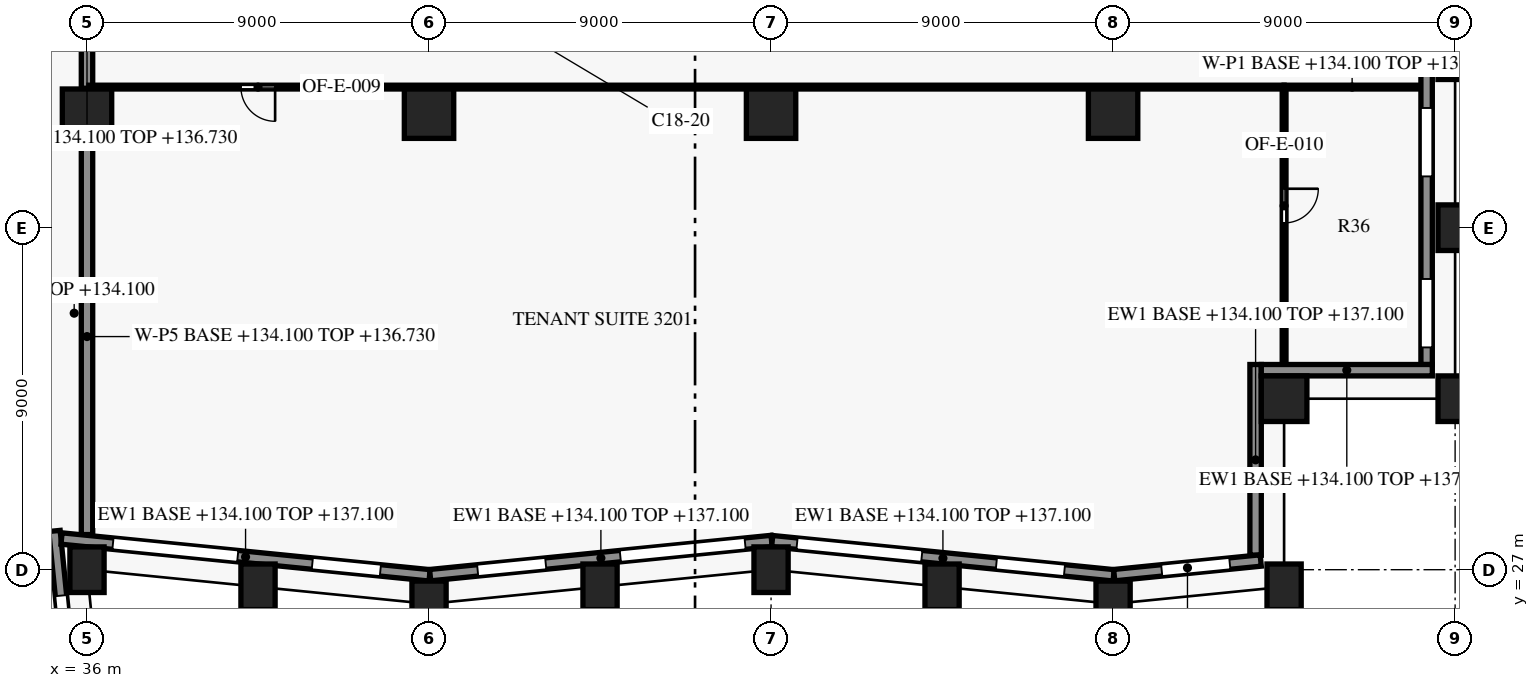
"""IFC4 building model, lengths in metres.
Left out: names, types, materials, properties, quantities, classifications, styles, units other than length and angle.
Written with IfcOpenShell. Run it as: python <this file> out.ifc"""

import sys

from ifc_helpers import new_model, si_unit, direction, frame, frame_2d, origin, origin_2d, place, context, subcontext, project, spatial, rectangle, extrude, element, fill, save


model = new_model("IFC4")
c1 = context("Model", 3, precision=1e-05, world=origin(), true_north=direction((0.0, 1.0)))
c2 = subcontext(c1, "Body", "Model", "MODEL_VIEW")
j1 = project(units=[si_unit("LENGTHUNIT", "METRE"), si_unit("PLANEANGLEUNIT", "RADIAN")], contexts=[c1])
p1 = place(None, origin())
s1 = spatial("IfcSite", under=j1, at=p1, CompositionType="ELEMENT")
p2 = place(p1, origin())
s2 = spatial("IfcBuilding", under=s1, at=p2, CompositionType="ELEMENT")
p3 = place(p2, frame((0.0, 0.0, 134.1)))
s3 = spatial("IfcBuildingStorey", under=s2, at=p3, CompositionType="ELEMENT", Elevation=134.1)
for number, where, z_axis, x_axis in (
    (1, (36.0, 27.0, 0.0), (0.0, 0.0, 1.0), (-0.1, 0.995, 0.0)),
    (2, (40.5, 26.55, 0.0), (0.0, 0.0, 1.0), (0.995, -0.1, 0.0)),
    (3, (45.0, 26.1, 0.0), (0.0, 0.0, 1.0), (1.0, 0.0, 0.0)),
    (4, (49.5, 26.55, 0.0), (0.0, 0.0, 1.0), (0.995, 0.1, 0.0)),
    (5, (54.0, 27.0, 0.0), (0.0, 0.0, 1.0), (1.0, 0.0, 0.0)),
    (6, (58.5, 26.55, 0.0), (0.0, 0.0, 1.0), (0.995, -0.1, 0.0)),
    (7, (63.0, 26.1, 0.0), (0.0, 0.0, 1.0), (1.0, 0.0, 0.0)),
    (8, (67.5, 26.55, 0.0), (0.0, 0.0, 1.0), (0.995, 0.1, 0.0)),
    (9, (72.0, 31.5, 0.0), (0.0, 0.0, 1.0), (0.0, 1.0, 0.0)),
    (10, (72.0, 36.0, 0.0), (0.0, 0.0, 1.0), (0.0, 1.0, 0.0)),
    (11, (72.0, 40.5, 0.0), (0.0, 0.0, 1.0), (0.0, 1.0, 0.0)),
):
    element("IfcColumn", number, at=place(p3, frame(where, z_axis=z_axis, x_axis=x_axis)), inside=s3, PredefinedType="COLUMN", context=c2, shape_type="SweptSolid", body=[
        extrude(rectangle(XDim=0.9, YDim=1.2, at=origin_2d()), origin(), (0.0, 0.0, 1.0), 3.8),
    ])
p4 = place(p3, frame((67.5, 31.5, 0.0), z_axis=(0.0, 0.0, 1.0), x_axis=(1.0, 0.0, 0.0)))
e12 = element("IfcColumn", 12, at=p4, inside=s3, PredefinedType="COLUMN", context=c2, shape_type="SweptSolid", body=[
    extrude(rectangle(XDim=1.2, YDim=1.2, at=origin_2d()), origin(), (0.0, 0.0, 1.0), 3.8),
])
for number, where, z_axis, x_axis in (
    (13, (36.0, 39.0, 0.0), (0.0, 0.0, 1.0), (1.0, 0.0, 0.0)),
    (14, (45.0, 39.0, 0.0), (0.0, 0.0, 1.0), (1.0, 0.0, 0.0)),
    (15, (54.0, 39.0, 0.0), (0.0, 0.0, 1.0), (1.0, 0.0, 0.0)),
    (16, (63.0, 39.0, 0.0), (0.0, 0.0, 1.0), (1.0, 0.0, 0.0)),
):
    element("IfcColumn", number, at=place(p3, frame(where, z_axis=z_axis, x_axis=x_axis)), inside=s3, PredefinedType="COLUMN", context=c2, shape_type="SweptSolid", body=[
        extrude(rectangle(XDim=1.3, YDim=1.3, at=origin_2d()), origin(), (0.0, 0.0, 1.0), 3.8),
    ])
p5 = place(p3, frame((35.144, 28.02, 0.0), z_axis=(0.0, 0.0, 1.0), x_axis=(0.099503719021, -0.99503719021, 0.0)))
e17 = element("IfcWall", 17, at=p5, inside=s3, PredefinedType="SOLIDWALL", context=c2, shape_type="SweptSolid", body=[
    extrude(rectangle(XDim=10.04, YDim=0.3, at=frame_2d((5.02, 0.0))), origin(), (0.0, 0.0, 1.0), 3.0),
])
p6 = place(p5, frame((1.711, 0.0, 0.15)))
e18 = element("IfcOpeningElement", 18, at=p6, cuts=e17, PredefinedType="OPENING", context=c2, shape_type="SweptSolid", body=[
    extrude(rectangle(XDim=3.3, YDim=2.4, at=frame_2d((1.65, 1.2))), frame((0.0, 0.16, 0.0), z_axis=(0.0, -1.0, 0.0), x_axis=(1.0, 0.0, 0.0)), (0.0, 0.0, 1.0), 0.32),
])
p7 = place(p5, frame((6.984, 0.0, 0.75)))
e19 = element("IfcOpeningElement", 19, at=p7, cuts=e17, PredefinedType="OPENING", context=c2, shape_type="SweptSolid", body=[
    extrude(rectangle(XDim=1.8, YDim=1.8, at=frame_2d((0.9, 0.9))), frame((0.0, 0.16, 0.0), z_axis=(0.0, -1.0, 0.0), x_axis=(1.0, 0.0, 0.0)), (0.0, 0.0, 1.0), 0.32),
])
p8 = place(p3, frame((45.015, 26.852, 0.0), z_axis=(0.0, 0.0, 1.0), x_axis=(-0.995037438546, 0.099501235631, 0.0)))
e20 = element("IfcWall", 20, at=p8, inside=s3, PredefinedType="SOLIDWALL", context=c2, shape_type="SweptSolid", body=[
    extrude(rectangle(XDim=9.734, YDim=0.3, at=frame_2d((4.867, 0.0))), origin(), (0.0, 0.0, 1.0), 3.0),
])
p9 = place(p8, frame((1.301, 0.0, 0.75)))
e21 = element("IfcOpeningElement", 21, at=p9, cuts=e20, PredefinedType="OPENING", context=c2, shape_type="SweptSolid", body=[
    extrude(rectangle(XDim=1.8, YDim=1.8, at=frame_2d((0.9, 0.9))), frame((0.0, 0.16, 0.0), z_axis=(0.0, -1.0, 0.0), x_axis=(1.0, 0.0, 0.0)), (0.0, 0.0, 1.0), 0.32),
])
p10 = place(p8, frame((5.073, 0.0, 0.15)))
e22 = element("IfcOpeningElement", 22, at=p10, cuts=e20, PredefinedType="OPENING", context=c2, shape_type="SweptSolid", body=[
    extrude(rectangle(XDim=3.3, YDim=2.4, at=frame_2d((1.65, 1.2))), frame((0.0, 0.16, 0.0), z_axis=(0.0, -1.0, 0.0), x_axis=(1.0, 0.0, 0.0)), (0.0, 0.0, 1.0), 0.32),
])
p11 = place(p3, frame((54.015, 27.755, 0.0), z_axis=(0.0, 0.0, 1.0), x_axis=(-0.995037993253, -0.099495688264, 0.0)))
e23 = element("IfcWall", 23, at=p11, inside=s3, PredefinedType="SOLIDWALL", context=c2, shape_type="SweptSolid", body=[
    extrude(rectangle(XDim=9.03, YDim=0.3, at=frame_2d((4.515, 0.0))), origin(), (0.0, 0.0, 1.0), 3.0),
])
p12 = place(p11, frame((0.701, 0.0, 0.15)))
e24 = element("IfcOpeningElement", 24, at=p12, cuts=e23, PredefinedType="OPENING", context=c2, shape_type="SweptSolid", body=[
    extrude(rectangle(XDim=3.3, YDim=2.4, at=frame_2d((1.65, 1.2))), frame((0.0, 0.16, 0.0), z_axis=(0.0, -1.0, 0.0), x_axis=(1.0, 0.0, 0.0)), (0.0, 0.0, 1.0), 0.32),
])
p13 = place(p11, frame((5.974, 0.0, 0.75)))
e25 = element("IfcOpeningElement", 25, at=p13, cuts=e23, PredefinedType="OPENING", context=c2, shape_type="SweptSolid", body=[
    extrude(rectangle(XDim=1.8, YDim=1.8, at=frame_2d((0.9, 0.9))), frame((0.0, 0.16, 0.0), z_axis=(0.0, -1.0, 0.0), x_axis=(1.0, 0.0, 0.0)), (0.0, 0.0, 1.0), 0.32),
])
p14 = place(p3, frame((63.015, 26.852, 0.0), z_axis=(0.0, 0.0, 1.0), x_axis=(-0.995037993253, 0.099495688264, 0.0)))
e26 = element("IfcWall", 26, at=p14, inside=s3, PredefinedType="SOLIDWALL", context=c2, shape_type="SweptSolid", body=[
    extrude(rectangle(XDim=9.03, YDim=0.3, at=frame_2d((4.515, 0.0))), origin(), (0.0, 0.0, 1.0), 3.0),
])
p15 = place(p14, frame((1.301, 0.0, 0.75)))
e27 = element("IfcOpeningElement", 27, at=p15, cuts=e26, PredefinedType="OPENING", context=c2, shape_type="SweptSolid", body=[
    extrude(rectangle(XDim=1.8, YDim=1.8, at=frame_2d((0.9, 0.9))), frame((0.0, 0.16, 0.0), z_axis=(0.0, -1.0, 0.0), x_axis=(1.0, 0.0, 0.0)), (0.0, 0.0, 1.0), 0.32),
])
p16 = place(p14, frame((5.073, 0.0, 0.15)))
e28 = element("IfcOpeningElement", 28, at=p16, cuts=e26, PredefinedType="OPENING", context=c2, shape_type="SweptSolid", body=[
    extrude(rectangle(XDim=3.3, YDim=2.4, at=frame_2d((1.65, 1.2))), frame((0.0, 0.16, 0.0), z_axis=(0.0, -1.0, 0.0), x_axis=(1.0, 0.0, 0.0)), (0.0, 0.0, 1.0), 0.32),
])
p17 = place(p3, frame((66.885, 27.242, 0.0), z_axis=(0.0, 0.0, 1.0), x_axis=(-0.995037814081, -0.099497480111, 0.0)))
e29 = element("IfcWall", 29, at=p17, inside=s3, PredefinedType="SOLIDWALL", context=c2, shape_type="SweptSolid", body=[
    extrude(rectangle(XDim=3.875, YDim=0.3, at=frame_2d((1.937, 0.0))), origin(), (0.0, 0.0, 1.0), 3.0),
])
p18 = place(p17, frame((0.818, 0.0, 0.75)))
e30 = element("IfcOpeningElement", 30, at=p18, cuts=e29, PredefinedType="OPENING", context=c2, shape_type="SweptSolid", body=[
    extrude(rectangle(XDim=1.8, YDim=1.8, at=frame_2d((0.9, 0.9))), frame((0.0, 0.16, 0.0), z_axis=(0.0, -1.0, 0.0), x_axis=(1.0, 0.0, 0.0)), (0.0, 0.0, 1.0), 0.32),
])
p19 = place(p3, frame((66.75, 32.4, 0.0), z_axis=(0.0, 0.0, 1.0), x_axis=(0.0, -1.0, 0.0)))
e31 = element("IfcWall", 31, at=p19, inside=s3, PredefinedType="SOLIDWALL", context=c2, shape_type="SweptSolid", body=[
    extrude(rectangle(XDim=5.019, YDim=0.3, at=frame_2d((2.51, 0.0))), origin(), (0.0, 0.0, 1.0), 3.0),
])
p20 = place(p3, frame((71.4, 32.25, 0.0), z_axis=(0.0, 0.0, 1.0), x_axis=(-1.0, 0.0, 0.0)))
e32 = element("IfcWall", 32, at=p20, inside=s3, PredefinedType="SOLIDWALL", context=c2, shape_type="SweptSolid", body=[
    extrude(rectangle(XDim=4.5, YDim=0.3, at=frame_2d((2.25, 0.0))), origin(), (0.0, 0.0, 1.0), 3.0),
])
p21 = place(p3, frame((71.25, 57.9, 0.0), z_axis=(0.0, 0.0, 1.0), x_axis=(0.0, -1.0, 0.0)))
e33 = element("IfcWall", 33, at=p21, inside=s3, PredefinedType="SOLIDWALL", context=c2, shape_type="SweptSolid", body=[
    extrude(rectangle(XDim=25.502, YDim=0.3, at=frame_2d((12.751, 0.0))), origin(), (0.0, 0.0, 1.0), 3.0),
])
p22 = place(p21, frame((0.75, 0.0, 0.75)))
e34 = element("IfcOpeningElement", 34, at=p22, cuts=e33, PredefinedType="OPENING", context=c2, shape_type="SweptSolid", body=[
    extrude(rectangle(XDim=1.8, YDim=1.8, at=frame_2d((0.9, 0.9))), frame((0.0, 0.16, 0.0), z_axis=(0.0, -1.0, 0.0), x_axis=(1.0, 0.0, 0.0)), (0.0, 0.0, 1.0), 0.32),
])
p23 = place(p21, frame((5.25, 0.0, 0.75)))
e35 = element("IfcOpeningElement", 35, at=p23, cuts=e33, PredefinedType="OPENING", context=c2, shape_type="SweptSolid", body=[
    extrude(rectangle(XDim=1.8, YDim=1.8, at=frame_2d((0.9, 0.9))), frame((0.0, 0.16, 0.0), z_axis=(0.0, -1.0, 0.0), x_axis=(1.0, 0.0, 0.0)), (0.0, 0.0, 1.0), 0.32),
])
p24 = place(p21, frame((9.0, 0.0, 0.15)))
e36 = element("IfcOpeningElement", 36, at=p24, cuts=e33, PredefinedType="OPENING", context=c2, shape_type="SweptSolid", body=[
    extrude(rectangle(XDim=3.3, YDim=2.4, at=frame_2d((1.65, 1.2))), frame((0.0, 0.16, 0.0), z_axis=(0.0, -1.0, 0.0), x_axis=(1.0, 0.0, 0.0)), (0.0, 0.0, 1.0), 0.32),
])
p25 = place(p21, frame((13.5, 0.0, 0.15)))
e37 = element("IfcOpeningElement", 37, at=p25, cuts=e33, PredefinedType="OPENING", context=c2, shape_type="SweptSolid", body=[
    extrude(rectangle(XDim=3.3, YDim=2.4, at=frame_2d((1.65, 1.2))), frame((0.0, 0.16, 0.0), z_axis=(0.0, -1.0, 0.0), x_axis=(1.0, 0.0, 0.0)), (0.0, 0.0, 1.0), 0.32),
])
p26 = place(p21, frame((18.75, 0.0, 0.75)))
e38 = element("IfcOpeningElement", 38, at=p26, cuts=e33, PredefinedType="OPENING", context=c2, shape_type="SweptSolid", body=[
    extrude(rectangle(XDim=1.8, YDim=1.8, at=frame_2d((0.9, 0.9))), frame((0.0, 0.16, 0.0), z_axis=(0.0, -1.0, 0.0), x_axis=(1.0, 0.0, 0.0)), (0.0, 0.0, 1.0), 0.32),
])
p27 = place(p21, frame((23.25, 0.0, 0.75)))
e39 = element("IfcOpeningElement", 39, at=p27, cuts=e33, PredefinedType="OPENING", context=c2, shape_type="SweptSolid", body=[
    extrude(rectangle(XDim=1.8, YDim=1.8, at=frame_2d((0.9, 0.9))), frame((0.0, 0.16, 0.0), z_axis=(0.0, -1.0, 0.0), x_axis=(1.0, 0.0, 0.0)), (0.0, 0.0, 1.0), 0.32),
])
for number, where, z_axis, x_axis in (
    (40, (24.655, 27.0, 0.0), (0.0, 0.0, 1.0), (1.0, 0.0, 0.0)),
    (41, (36.0, 27.925, 0.0), (0.0, 0.0, 1.0), (0.0, 1.0, 0.0)),
):
    element("IfcWall", number, at=place(p3, frame(where, z_axis=z_axis, x_axis=x_axis)), inside=s3, PredefinedType="PARTITIONING", context=c2, shape_type="SweptSolid", body=[
        extrude(rectangle(XDim=10.42, YDim=0.3, at=frame_2d((5.21, 0.0))), origin(), (0.0, 0.0, 1.0), 2.63),
    ])
p28 = place(p3, frame((67.5, 39.65, 0.0), z_axis=(0.0, 0.0, 1.0), x_axis=(0.0, -1.0, 0.0)))
e42 = element("IfcWall", 42, at=p28, inside=s3, PredefinedType="PARTITIONING", context=c2, shape_type="SweptSolid", body=[
    extrude(rectangle(XDim=7.23, YDim=0.1, at=frame_2d((3.615, 0.0))), origin(), (0.0, 0.0, 1.0), 2.63),
])
p29 = place(p28, frame((2.625, 0.0, 0.0)))
e43 = element("IfcOpeningElement", 43, at=p29, cuts=e42, PredefinedType="OPENING", context=c2, shape_type="SweptSolid", body=[
    extrude(rectangle(XDim=0.9, YDim=2.1, at=frame_2d((0.45, 1.05))), frame((0.0, 0.06, 0.0), z_axis=(0.0, -1.0, 0.0), x_axis=(1.0, 0.0, 0.0)), (0.0, 0.0, 1.0), 0.12),
])
p30 = place(p3, frame((67.5, 39.7, 0.0), z_axis=(0.0, 0.0, 1.0), x_axis=(-1.0, 0.0, 0.0)))
e44 = element("IfcWall", 44, at=p30, inside=s3, PredefinedType="PARTITIONING", context=c2, shape_type="SweptSolid", body=[
    extrude(rectangle(XDim=31.45, YDim=0.1, at=frame_2d((15.725, 0.0))), origin(), (0.0, 0.0, 1.0), 2.63),
])
p31 = place(p30, frame((26.55, 0.0, 0.0)))
e45 = element("IfcOpeningElement", 45, at=p31, cuts=e44, PredefinedType="OPENING", context=c2, shape_type="SweptSolid", body=[
    extrude(rectangle(XDim=0.9, YDim=2.1, at=frame_2d((0.45, 1.05))), frame((0.0, 0.06, 0.0), z_axis=(0.0, -1.0, 0.0), x_axis=(1.0, 0.0, 0.0)), (0.0, 0.0, 1.0), 0.12),
])
p32 = place(p3, frame((71.08, 39.7, 0.0), z_axis=(0.0, 0.0, 1.0), x_axis=(-1.0, 0.0, 0.0)))
e46 = element("IfcWall", 46, at=p32, inside=s3, PredefinedType="PARTITIONING", context=c2, shape_type="SweptSolid", body=[
    extrude(rectangle(XDim=3.58, YDim=0.1, at=frame_2d((1.79, 0.0))), origin(), (0.0, 0.0, 1.0), 3.33),
])
p33 = place(p3, frame((36.0, 39.67, 0.0), z_axis=(0.0, 0.0, 1.0), x_axis=(0.0, 1.0, 0.0)))
e47 = element("IfcWall", 47, at=p33, inside=s3, PredefinedType="PARTITIONING", context=c2, shape_type="SweptSolid", body=[
    extrude(rectangle(XDim=3.18, YDim=0.3, at=frame_2d((1.59, 0.0))), origin(), (0.0, 0.0, 1.0), 2.63),
])
p34 = place(p6, origin())
e48 = element("IfcWindow", 48, at=p34, inside=s3, PartitioningType="SINGLE_PANEL", PredefinedType="WINDOW", context=c2, shape_type="SweptSolid", body=[
    extrude(rectangle(XDim=3.3, YDim=2.4, at=frame_2d((1.65, 1.2))), frame((0.0, 0.03, 0.0), z_axis=(0.0, -1.0, 0.0), x_axis=(1.0, 0.0, 0.0)), (0.0, 0.0, 1.0), 0.06),
])
fill(e18, e48)
p35 = place(p9, origin())
e49 = element("IfcWindow", 49, at=p35, inside=s3, PartitioningType="SINGLE_PANEL", PredefinedType="WINDOW", context=c2, shape_type="SweptSolid", body=[
    extrude(rectangle(XDim=1.8, YDim=1.8, at=frame_2d((0.9, 0.9))), frame((0.0, 0.03, 0.0), z_axis=(0.0, -1.0, 0.0), x_axis=(1.0, 0.0, 0.0)), (0.0, 0.0, 1.0), 0.06),
])
fill(e21, e49)
p36 = place(p10, origin())
e50 = element("IfcWindow", 50, at=p36, inside=s3, PartitioningType="SINGLE_PANEL", PredefinedType="WINDOW", context=c2, shape_type="SweptSolid", body=[
    extrude(rectangle(XDim=3.3, YDim=2.4, at=frame_2d((1.65, 1.2))), frame((0.0, 0.03, 0.0), z_axis=(0.0, -1.0, 0.0), x_axis=(1.0, 0.0, 0.0)), (0.0, 0.0, 1.0), 0.06),
])
fill(e22, e50)
p37 = place(p12, origin())
e51 = element("IfcWindow", 51, at=p37, inside=s3, PartitioningType="SINGLE_PANEL", PredefinedType="WINDOW", context=c2, shape_type="SweptSolid", body=[
    extrude(rectangle(XDim=3.3, YDim=2.4, at=frame_2d((1.65, 1.2))), frame((0.0, 0.03, 0.0), z_axis=(0.0, -1.0, 0.0), x_axis=(1.0, 0.0, 0.0)), (0.0, 0.0, 1.0), 0.06),
])
fill(e24, e51)
p38 = place(p13, origin())
e52 = element("IfcWindow", 52, at=p38, inside=s3, PartitioningType="SINGLE_PANEL", PredefinedType="WINDOW", context=c2, shape_type="SweptSolid", body=[
    extrude(rectangle(XDim=1.8, YDim=1.8, at=frame_2d((0.9, 0.9))), frame((0.0, 0.03, 0.0), z_axis=(0.0, -1.0, 0.0), x_axis=(1.0, 0.0, 0.0)), (0.0, 0.0, 1.0), 0.06),
])
fill(e25, e52)
p39 = place(p15, origin())
e53 = element("IfcWindow", 53, at=p39, inside=s3, PartitioningType="SINGLE_PANEL", PredefinedType="WINDOW", context=c2, shape_type="SweptSolid", body=[
    extrude(rectangle(XDim=1.8, YDim=1.8, at=frame_2d((0.9, 0.9))), frame((0.0, 0.03, 0.0), z_axis=(0.0, -1.0, 0.0), x_axis=(1.0, 0.0, 0.0)), (0.0, 0.0, 1.0), 0.06),
])
fill(e27, e53)
p40 = place(p16, origin())
e54 = element("IfcWindow", 54, at=p40, inside=s3, PartitioningType="SINGLE_PANEL", PredefinedType="WINDOW", context=c2, shape_type="SweptSolid", body=[
    extrude(rectangle(XDim=3.3, YDim=2.4, at=frame_2d((1.65, 1.2))), frame((0.0, 0.03, 0.0), z_axis=(0.0, -1.0, 0.0), x_axis=(1.0, 0.0, 0.0)), (0.0, 0.0, 1.0), 0.06),
])
fill(e28, e54)
p41 = place(p18, origin())
e55 = element("IfcWindow", 55, at=p41, inside=s3, PartitioningType="SINGLE_PANEL", PredefinedType="WINDOW", context=c2, shape_type="SweptSolid", body=[
    extrude(rectangle(XDim=1.8, YDim=1.8, at=frame_2d((0.9, 0.9))), frame((0.0, 0.03, 0.0), z_axis=(0.0, -1.0, 0.0), x_axis=(1.0, 0.0, 0.0)), (0.0, 0.0, 1.0), 0.06),
])
fill(e30, e55)
p42 = place(p26, origin())
e56 = element("IfcWindow", 56, at=p42, inside=s3, PartitioningType="SINGLE_PANEL", PredefinedType="WINDOW", context=c2, shape_type="SweptSolid", body=[
    extrude(rectangle(XDim=1.8, YDim=1.8, at=frame_2d((0.9, 0.9))), frame((0.0, 0.03, 0.0), z_axis=(0.0, -1.0, 0.0), x_axis=(1.0, 0.0, 0.0)), (0.0, 0.0, 1.0), 0.06),
])
fill(e38, e56)
p43 = place(p27, origin())
e57 = element("IfcWindow", 57, at=p43, inside=s3, PartitioningType="SINGLE_PANEL", PredefinedType="WINDOW", context=c2, shape_type="SweptSolid", body=[
    extrude(rectangle(XDim=1.8, YDim=1.8, at=frame_2d((0.9, 0.9))), frame((0.0, 0.03, 0.0), z_axis=(0.0, -1.0, 0.0), x_axis=(1.0, 0.0, 0.0)), (0.0, 0.0, 1.0), 0.06),
])
fill(e39, e57)
p44 = place(p31, origin())
e58 = element("IfcDoor", 58, at=p44, inside=s3, OperationType="SINGLE_SWING_LEFT", PredefinedType="DOOR", context=c2, shape_type="SweptSolid", body=[
    extrude(rectangle(XDim=0.9, YDim=2.1, at=frame_2d((0.45, 1.05))), frame((0.0, 0.025, 0.0), z_axis=(0.0, -1.0, 0.0), x_axis=(1.0, 0.0, 0.0)), (0.0, 0.0, 1.0), 0.05),
])
fill(e45, e58)
p45 = place(p29, origin())
e59 = element("IfcDoor", 59, at=p45, inside=s3, OperationType="SINGLE_SWING_LEFT", PredefinedType="DOOR", context=c2, shape_type="SweptSolid", body=[
    extrude(rectangle(XDim=0.9, YDim=2.1, at=frame_2d((0.45, 1.05))), frame((0.0, 0.025, 0.0), z_axis=(0.0, -1.0, 0.0), x_axis=(1.0, 0.0, 0.0)), (0.0, 0.0, 1.0), 0.05),
])
fill(e43, e59)
save(model, sys.argv[1])
